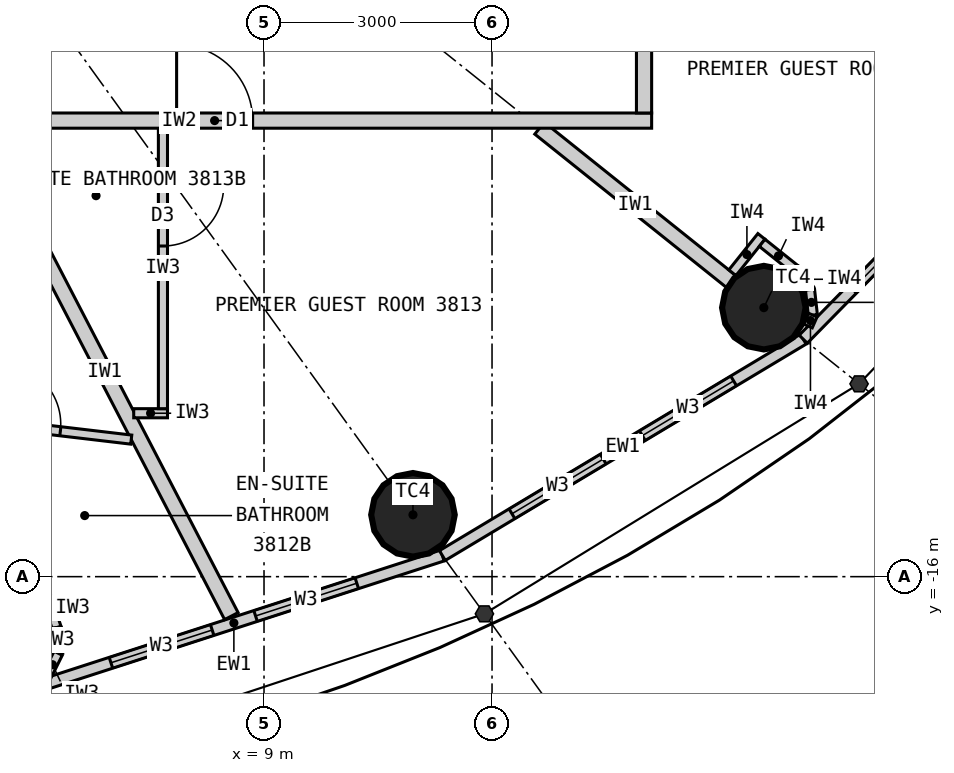
"""IFC4 building model, lengths in metres.
Left out: names, types, materials, properties, quantities, classifications, styles, units other than length and angle.
Written with IfcOpenShell. Run it as: python <this file> out.ifc"""

import sys

from ifc_helpers import new_model, si_unit, direction, frame, frame_2d, origin, origin_2d, place, context, subcontext, project, spatial, rectangle, circle, extrude, element, fill, save


model = new_model("IFC4")
c1 = context("Model", 3, precision=1e-05, world=origin(), true_north=direction((0.0, 1.0)))
c2 = subcontext(c1, "Body", "Model", "MODEL_VIEW")
j1 = project(units=[si_unit("LENGTHUNIT", "METRE"), si_unit("PLANEANGLEUNIT", "RADIAN")], contexts=[c1])
p1 = place(None, origin())
s1 = spatial("IfcSite", under=j1, at=p1, CompositionType="ELEMENT")
p2 = place(p1, origin())
s2 = spatial("IfcBuilding", under=s1, at=p2, CompositionType="ELEMENT")
p3 = place(p2, frame((0.0, 0.0, 146.7)))
s3 = spatial("IfcBuildingStorey", under=s2, at=p3, CompositionType="ELEMENT", Elevation=146.7)
for number, where, z_axis, x_axis in (
    (1, (10.96, -15.186, 0.0), (0.0, 0.0, 1.0), (1.0, 0.0, 0.0)),
    (2, (15.576, -12.461, 0.0), (0.0, 0.0, 1.0), (1.0, 0.0, 0.0)),
):
    element("IfcColumn", number, at=place(p3, frame(where, z_axis=z_axis, x_axis=x_axis)), inside=s3, PredefinedType="COLUMN", context=c2, shape_type="SweptSolid", body=[
        extrude(circle(Radius=0.55, at=origin_2d()), origin(), (0.0, 0.0, 1.0), 3.3),
    ])
p4 = place(p3, frame((5.86, -17.497, 0.0), z_axis=(0.0, 0.0, 1.0), x_axis=(0.951432482129, 0.307857486429, 0.0)))
e3 = element("IfcWall", 3, at=p4, inside=s3, PredefinedType="ELEMENTEDWALL", context=c2, shape_type="SweptSolid", body=[
    extrude(rectangle(XDim=5.766, YDim=0.15, at=frame_2d((2.883, 0.0))), origin(), (0.0, 0.0, 1.0), 3.12),
])
p5 = place(p4, frame((1.183, 0.0, 0.9)))
e4 = element("IfcOpeningElement", 4, at=p5, cuts=e3, PredefinedType="OPENING", context=c2, shape_type="SweptSolid", body=[
    extrude(rectangle(XDim=1.4, YDim=1.9, at=frame_2d((0.7, 0.95))), frame((0.0, 0.085, 0.0), z_axis=(0.0, -1.0, 0.0), x_axis=(1.0, 0.0, 0.0)), (0.0, 0.0, 1.0), 0.17),
])
p6 = place(p4, frame((3.183, 0.0, 0.9)))
e5 = element("IfcOpeningElement", 5, at=p6, cuts=e3, PredefinedType="OPENING", context=c2, shape_type="SweptSolid", body=[
    extrude(rectangle(XDim=1.4, YDim=1.9, at=frame_2d((0.7, 0.95))), frame((0.0, 0.085, 0.0), z_axis=(0.0, -1.0, 0.0), x_axis=(1.0, 0.0, 0.0)), (0.0, 0.0, 1.0), 0.17),
])
p7 = place(p3, frame((11.346, -15.722, 0.0), z_axis=(0.0, 0.0, 1.0), x_axis=(0.857695199231, 0.514158482587, 0.0)))
e6 = element("IfcWall", 6, at=p7, inside=s3, PredefinedType="ELEMENTEDWALL", context=c2, shape_type="SweptSolid", body=[
    extrude(rectangle(XDim=5.536, YDim=0.15, at=frame_2d((2.768, 0.0))), origin(), (0.0, 0.0, 1.0), 3.12),
])
p8 = place(p7, frame((1.068, 0.0, 0.9)))
e7 = element("IfcOpeningElement", 7, at=p8, cuts=e6, PredefinedType="OPENING", context=c2, shape_type="SweptSolid", body=[
    extrude(rectangle(XDim=1.4, YDim=1.9, at=frame_2d((0.7, 0.95))), frame((0.0, 0.085, 0.0), z_axis=(0.0, -1.0, 0.0), x_axis=(1.0, 0.0, 0.0)), (0.0, 0.0, 1.0), 0.17),
])
p9 = place(p7, frame((3.068, 0.0, 0.9)))
e8 = element("IfcOpeningElement", 8, at=p9, cuts=e6, PredefinedType="OPENING", context=c2, shape_type="SweptSolid", body=[
    extrude(rectangle(XDim=1.4, YDim=1.9, at=frame_2d((0.7, 0.95))), frame((0.0, 0.085, 0.0), z_axis=(0.0, -1.0, 0.0), x_axis=(1.0, 0.0, 0.0)), (0.0, 0.0, 1.0), 0.17),
])
p10 = place(p3, frame((16.095, -12.876, 0.0), z_axis=(0.0, 0.0, 1.0), x_axis=(0.700727467776, 0.71342905457, 0.0)))
e9 = element("IfcWall", 9, at=p10, inside=s3, PredefinedType="ELEMENTEDWALL", context=c2, shape_type="SweptSolid", body=[
    extrude(rectangle(XDim=5.247, YDim=0.15, at=frame_2d((2.624, 0.0))), origin(), (0.0, 0.0, 1.0), 3.12),
])
p11 = place(p10, frame((0.924, 0.0, 0.9)))
e10 = element("IfcOpeningElement", 10, at=p11, cuts=e9, PredefinedType="OPENING", context=c2, shape_type="SweptSolid", body=[
    extrude(rectangle(XDim=1.4, YDim=1.9, at=frame_2d((0.7, 0.95))), frame((0.0, 0.085, 0.0), z_axis=(0.0, -1.0, 0.0), x_axis=(1.0, 0.0, 0.0)), (0.0, 0.0, 1.0), 0.17),
])
p12 = place(p10, frame((2.924, 0.0, 0.9)))
e11 = element("IfcOpeningElement", 11, at=p12, cuts=e9, PredefinedType="OPENING", context=c2, shape_type="SweptSolid", body=[
    extrude(rectangle(XDim=1.4, YDim=1.9, at=frame_2d((0.7, 0.95))), frame((0.0, 0.085, 0.0), z_axis=(0.0, -1.0, 0.0), x_axis=(1.0, 0.0, 0.0)), (0.0, 0.0, 1.0), 0.17),
])
p13 = place(p3, frame((5.24, -10.1, 0.0), z_axis=(0.0, 0.0, 1.0), x_axis=(0.460532965373, -0.887642601391, 0.0)))
e12 = element("IfcWall", 12, at=p13, inside=s3, PredefinedType="PARTITIONING", context=c2, shape_type="SweptSolid", body=[
    extrude(rectangle(XDim=7.231, YDim=0.2, at=frame_2d((3.616, 0.0))), origin(), (0.0, 0.0, 1.0), 3.12),
])
p14 = place(p3, frame((12.625, -10.1, 0.0), z_axis=(0.0, 0.0, 1.0), x_axis=(0.780876185034, -0.624685827954, 0.0)))
e13 = element("IfcWall", 13, at=p14, inside=s3, PredefinedType="PARTITIONING", context=c2, shape_type="SweptSolid", body=[
    extrude(rectangle(XDim=3.229, YDim=0.2, at=frame_2d((1.615, 0.0))), origin(), (0.0, 0.0, 1.0), 2.42),
])
p15 = place(p3, frame((7.253, -14.197, 0.0), z_axis=(0.0, 0.0, 1.0), x_axis=(-0.993128188393, 0.117031625725, 0.0)))
e14 = element("IfcWall", 14, at=p15, inside=s3, PredefinedType="PARTITIONING", context=c2, shape_type="SweptSolid", body=[
    extrude(rectangle(XDim=2.678, YDim=0.12, at=frame_2d((1.339, 0.0))), origin(), (0.0, 0.0, 1.0), 3.12),
])
p16 = place(p15, frame((0.939, 0.0, 0.0)))
e15 = element("IfcOpeningElement", 15, at=p16, cuts=e14, PredefinedType="OPENING", context=c2, shape_type="SweptSolid", body=[
    extrude(rectangle(XDim=0.8, YDim=2.1, at=frame_2d((0.4, 1.05))), frame((0.0, 0.07, 0.0), z_axis=(0.0, -1.0, 0.0), x_axis=(1.0, 0.0, 0.0)), (0.0, 0.0, 1.0), 0.14),
])
p17 = place(p3, frame((6.097, -16.149, 0.0), z_axis=(0.0, 0.0, 1.0), x_axis=(0.317292604854, -0.948327687514, 0.0)))
e16 = element("IfcWall", 16, at=p17, inside=s3, PredefinedType="PARTITIONING", context=c2, shape_type="SweptSolid", body=[
    extrude(rectangle(XDim=0.55, YDim=0.12, at=frame_2d((0.275, 0.0))), origin(), (0.0, 0.0, 1.0), 3.12),
])
for number, where, z_axis, x_axis in (
    (17, (6.271, -16.67, 0.0), (0.0, 0.0, 1.0), (0.061, -0.998, 0.0)),
    (18, (6.292, -17.007, 0.0), (0.0, 0.0, 1.0), (-0.445, -0.895, 0.0)),
):
    element("IfcWall", number, at=place(p3, frame(where, z_axis=z_axis, x_axis=x_axis)), inside=s3, PredefinedType="PARTITIONING", context=c2, shape_type="SweptSolid", body=[
        extrude(rectangle(XDim=0.338, YDim=0.12, at=frame_2d((0.169, 0.0))), origin(), (0.0, 0.0, 1.0), 3.12),
    ])
p18 = place(p3, frame((7.286, -13.85, 0.0), z_axis=(0.0, 0.0, 1.0), x_axis=(1.0, 0.0, 0.0)))
e19 = element("IfcWall", 19, at=p18, inside=s3, PredefinedType="PARTITIONING", context=c2, shape_type="SweptSolid", body=[
    extrude(rectangle(XDim=0.444, YDim=0.12, at=frame_2d((0.222, 0.0))), origin(), (0.0, 0.0, 1.0), 3.12),
])
p19 = place(p3, frame((7.67, -10.1, 0.0), z_axis=(0.0, 0.0, 1.0), x_axis=(0.0, -1.0, 0.0)))
e20 = element("IfcWall", 20, at=p19, inside=s3, PredefinedType="PARTITIONING", context=c2, shape_type="SweptSolid", body=[
    extrude(rectangle(XDim=3.69, YDim=0.12, at=frame_2d((1.845, 0.0))), origin(), (0.0, 0.0, 1.0), 3.12),
])
p20 = place(p19, frame((0.75, 0.0, 0.0)))
e21 = element("IfcOpeningElement", 21, at=p20, cuts=e20, PredefinedType="OPENING", context=c2, shape_type="SweptSolid", body=[
    extrude(rectangle(XDim=0.8, YDim=2.1, at=frame_2d((0.4, 1.05))), frame((0.0, 0.07, 0.0), z_axis=(0.0, -1.0, 0.0), x_axis=(1.0, 0.0, 0.0)), (0.0, 0.0, 1.0), 0.14),
])
p21 = place(p3, frame((14.1, -10.0, 0.0), z_axis=(0.0, 0.0, 1.0), x_axis=(-1.0, 0.0, 0.0)))
e22 = element("IfcWall", 22, at=p21, inside=s3, PredefinedType="PARTITIONING", context=c2, shape_type="SweptSolid", body=[
    extrude(rectangle(XDim=12.43, YDim=0.2, at=frame_2d((6.215, 0.0))), origin(), (0.0, 0.0, 1.0), 3.12),
])
p22 = place(p21, frame((5.25, 0.0, 0.0)))
e23 = element("IfcOpeningElement", 23, at=p22, cuts=e22, PredefinedType="OPENING", context=c2, shape_type="SweptSolid", body=[
    extrude(rectangle(XDim=1.0, YDim=2.2, at=frame_2d((0.5, 1.1))), frame((0.0, 0.11, 0.0), z_axis=(0.0, -1.0, 0.0), x_axis=(1.0, 0.0, 0.0)), (0.0, 0.0, 1.0), 0.22),
])
p23 = place(p3, frame((14.0, -9.9, 0.0), z_axis=(0.0, 0.0, 1.0), x_axis=(0.0, 1.0, 0.0)))
e24 = element("IfcWall", 24, at=p23, inside=s3, PredefinedType="PARTITIONING", context=c2, shape_type="SweptSolid", body=[
    extrude(rectangle(XDim=8.23, YDim=0.2, at=frame_2d((4.115, 0.0))), origin(), (0.0, 0.0, 1.0), 3.12),
])
p24 = place(p23, frame((1.678, 0.0, 0.0)))
e25 = element("IfcOpeningElement", 25, at=p24, cuts=e24, PredefinedType="OPENING", context=c2, shape_type="SweptSolid", body=[
    extrude(rectangle(XDim=1.0, YDim=2.2, at=frame_2d((0.5, 1.1))), frame((0.0, 0.11, 0.0), z_axis=(0.0, -1.0, 0.0), x_axis=(1.0, 0.0, 0.0)), (0.0, 0.0, 1.0), 0.22),
])
p25 = place(p3, frame((15.162, -12.002, 0.0), z_axis=(0.0, 0.0, 1.0), x_axis=(0.624597762427, 0.780946627607, 0.0)))
e26 = element("IfcWall", 26, at=p25, inside=s3, PredefinedType="PARTITIONING", context=c2, shape_type="SweptSolid", body=[
    extrude(rectangle(XDim=0.612, YDim=0.12, at=frame_2d((0.306, 0.0))), origin(), (0.0, 0.0, 1.0), 3.12),
])
p26 = place(p3, frame((15.554, -11.608, 0.0), z_axis=(0.0, 0.0, 1.0), x_axis=(0.780695577787, -0.624911525597, 0.0)))
e27 = element("IfcWall", 27, at=p26, inside=s3, PredefinedType="PARTITIONING", context=c2, shape_type="SweptSolid", body=[
    extrude(rectangle(XDim=0.55, YDim=0.12, at=frame_2d((0.275, 0.0))), origin(), (0.0, 0.0, 1.0), 3.12),
])
p27 = place(p3, frame((15.984, -11.952, 0.0), z_axis=(0.0, 0.0, 1.0), x_axis=(0.592335221171, -0.805691619517, 0.0)))
e28 = element("IfcWall", 28, at=p27, inside=s3, PredefinedType="PARTITIONING", context=c2, shape_type="SweptSolid", body=[
    extrude(rectangle(XDim=0.338, YDim=0.12, at=frame_2d((0.169, 0.0))), origin(), (0.0, 0.0, 1.0), 3.12),
])
p28 = place(p3, frame((16.184, -12.224, 0.0), z_axis=(0.0, 0.0, 1.0), x_axis=(0.110669692975, -0.993857242795, 0.0)))
e29 = element("IfcWall", 29, at=p28, inside=s3, PredefinedType="PARTITIONING", context=c2, shape_type="SweptSolid", body=[
    extrude(rectangle(XDim=0.337, YDim=0.12, at=frame_2d((0.169, 0.0))), origin(), (0.0, 0.0, 1.0), 3.12),
])
p29 = place(p3, frame((16.221, -12.559, 0.0), z_axis=(0.0, 0.0, 1.0), x_axis=(-0.401064416249, -0.916049853457, 0.0)))
e30 = element("IfcWall", 30, at=p29, inside=s3, PredefinedType="PARTITIONING", context=c2, shape_type="SweptSolid", body=[
    extrude(rectangle(XDim=0.156, YDim=0.12, at=frame_2d((0.078, 0.0))), origin(), (0.0, 0.0, 1.0), 3.12),
])
p30 = place(p5, origin())
e31 = element("IfcWindow", 31, at=p30, inside=s3, PartitioningType="SINGLE_PANEL", PredefinedType="WINDOW", context=c2, shape_type="SweptSolid", body=[
    extrude(rectangle(XDim=1.4, YDim=1.9, at=frame_2d((0.7, 0.95))), frame((0.0, 0.03, 0.0), z_axis=(0.0, -1.0, 0.0), x_axis=(1.0, 0.0, 0.0)), (0.0, 0.0, 1.0), 0.06),
])
fill(e4, e31)
p31 = place(p6, origin())
e32 = element("IfcWindow", 32, at=p31, inside=s3, PartitioningType="SINGLE_PANEL", PredefinedType="WINDOW", context=c2, shape_type="SweptSolid", body=[
    extrude(rectangle(XDim=1.4, YDim=1.9, at=frame_2d((0.7, 0.95))), frame((0.0, 0.03, 0.0), z_axis=(0.0, -1.0, 0.0), x_axis=(1.0, 0.0, 0.0)), (0.0, 0.0, 1.0), 0.06),
])
fill(e5, e32)
p32 = place(p8, origin())
e33 = element("IfcWindow", 33, at=p32, inside=s3, PartitioningType="SINGLE_PANEL", PredefinedType="WINDOW", context=c2, shape_type="SweptSolid", body=[
    extrude(rectangle(XDim=1.4, YDim=1.9, at=frame_2d((0.7, 0.95))), frame((0.0, 0.03, 0.0), z_axis=(0.0, -1.0, 0.0), x_axis=(1.0, 0.0, 0.0)), (0.0, 0.0, 1.0), 0.06),
])
fill(e7, e33)
p33 = place(p9, origin())
e34 = element("IfcWindow", 34, at=p33, inside=s3, PartitioningType="SINGLE_PANEL", PredefinedType="WINDOW", context=c2, shape_type="SweptSolid", body=[
    extrude(rectangle(XDim=1.4, YDim=1.9, at=frame_2d((0.7, 0.95))), frame((0.0, 0.03, 0.0), z_axis=(0.0, -1.0, 0.0), x_axis=(1.0, 0.0, 0.0)), (0.0, 0.0, 1.0), 0.06),
])
fill(e8, e34)
p34 = place(p11, origin())
e35 = element("IfcWindow", 35, at=p34, inside=s3, PartitioningType="SINGLE_PANEL", PredefinedType="WINDOW", context=c2, shape_type="SweptSolid", body=[
    extrude(rectangle(XDim=1.4, YDim=1.9, at=frame_2d((0.7, 0.95))), frame((0.0, 0.03, 0.0), z_axis=(0.0, -1.0, 0.0), x_axis=(1.0, 0.0, 0.0)), (0.0, 0.0, 1.0), 0.06),
])
fill(e10, e35)
p35 = place(p16, origin())
e36 = element("IfcDoor", 36, at=p35, inside=s3, OperationType="SINGLE_SWING_RIGHT", PredefinedType="DOOR", context=c2, shape_type="SweptSolid", body=[
    extrude(rectangle(XDim=0.8, YDim=2.1, at=frame_2d((0.4, 1.05))), frame((0.0, 0.025, 0.0), z_axis=(0.0, -1.0, 0.0), x_axis=(1.0, 0.0, 0.0)), (0.0, 0.0, 1.0), 0.05),
])
fill(e15, e36)
p36 = place(p20, origin())
e37 = element("IfcDoor", 37, at=p36, inside=s3, OperationType="SINGLE_SWING_LEFT", PredefinedType="DOOR", context=c2, shape_type="SweptSolid", body=[
    extrude(rectangle(XDim=0.8, YDim=2.1, at=frame_2d((0.4, 1.05))), frame((0.0, 0.025, 0.0), z_axis=(0.0, -1.0, 0.0), x_axis=(1.0, 0.0, 0.0)), (0.0, 0.0, 1.0), 0.05),
])
fill(e21, e37)
p37 = place(p22, origin())
e38 = element("IfcDoor", 38, at=p37, inside=s3, OperationType="SINGLE_SWING_RIGHT", PredefinedType="DOOR", context=c2, shape_type="SweptSolid", body=[
    extrude(rectangle(XDim=1.0, YDim=2.2, at=frame_2d((0.5, 1.1))), frame((0.0, 0.025, 0.0), z_axis=(0.0, -1.0, 0.0), x_axis=(1.0, 0.0, 0.0)), (0.0, 0.0, 1.0), 0.05),
])
fill(e23, e38)
save(model, sys.argv[1])
